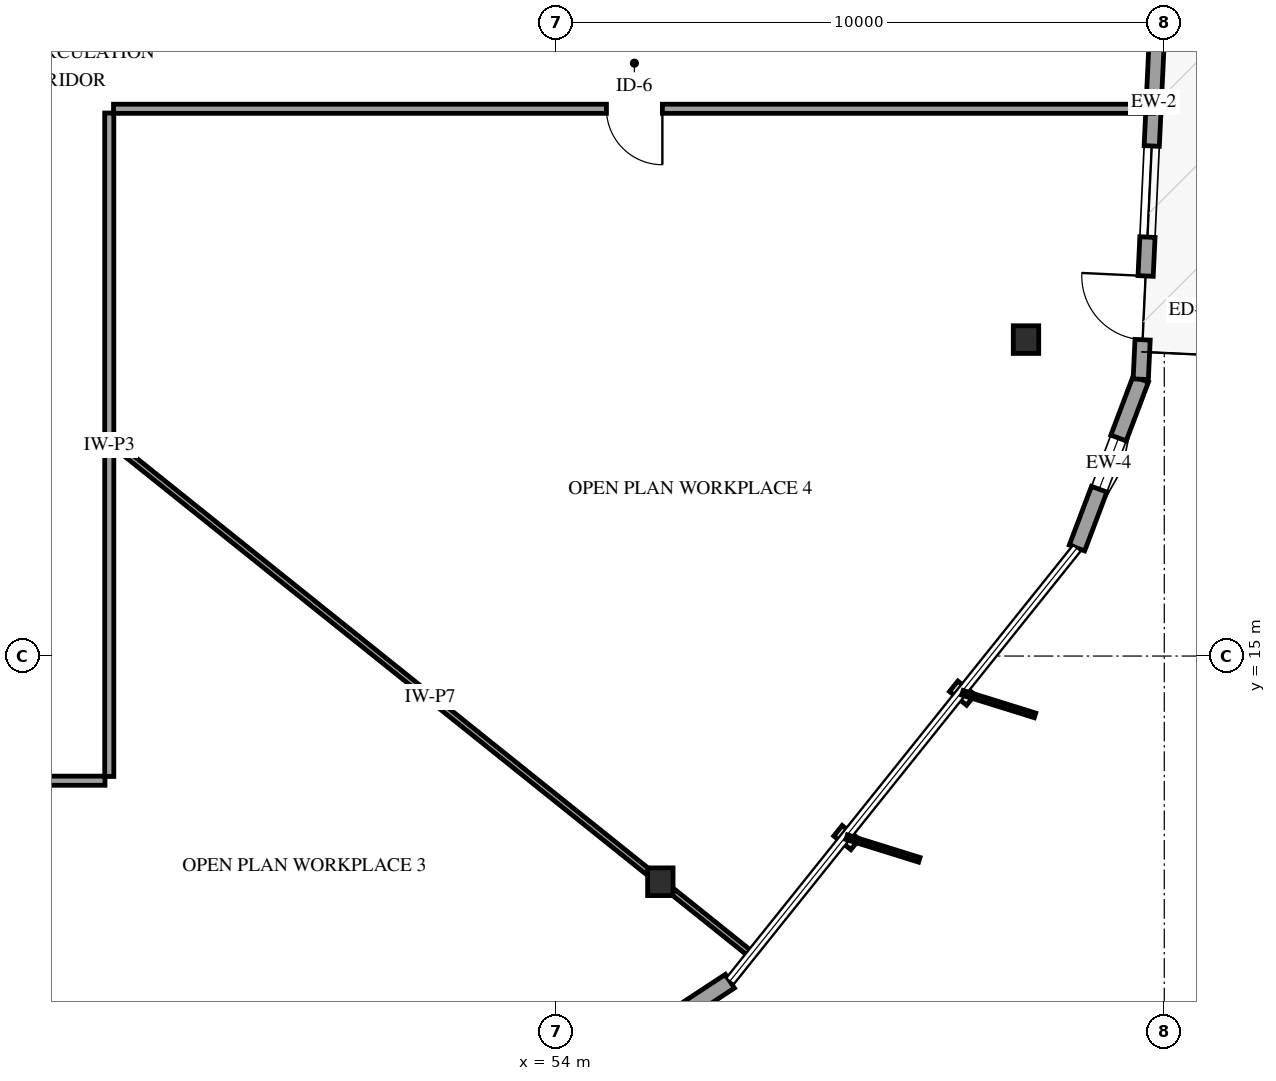
"""IFC4 building model, lengths in metres.
Left out: names, types, materials, properties, quantities, classifications, styles, units other than length and angle.
Written with IfcOpenShell. Run it as: python <this file> out.ifc"""

import sys

from ifc_helpers import new_model, si_unit, direction, frame, frame_2d, origin, origin_2d, place, context, subcontext, project, spatial, rectangle, i_section, extrude, element, fill, save


model = new_model("IFC4")
c1 = context("Model", 3, precision=1e-05, world=origin(), true_north=direction((0.0, 1.0)))
c2 = subcontext(c1, "Body", "Model", "MODEL_VIEW")
j1 = project(units=[si_unit("LENGTHUNIT", "METRE"), si_unit("PLANEANGLEUNIT", "RADIAN")], contexts=[c1])
p1 = place(None, origin())
s1 = spatial("IfcSite", under=j1, at=p1, CompositionType="ELEMENT")
p2 = place(p1, origin())
s2 = spatial("IfcBuilding", under=s1, at=p2, CompositionType="ELEMENT")
p3 = place(p2, frame((0.0, 0.0, 87.4)))
s3 = spatial("IfcBuildingStorey", under=s2, at=p3, CompositionType="ELEMENT", Elevation=87.4)
for number, where, z_axis, x_axis in (
    (1, (55.712, 11.289, -0.3), (0.0, 0.0, 1.0), (1.0, 0.0, 0.0)),
    (2, (61.726, 20.204, -0.3), (0.0, 0.0, 1.0), (1.0, 0.0, 0.0)),
):
    element("IfcColumn", number, at=place(p3, frame(where, z_axis=z_axis, x_axis=x_axis)), inside=s3, PredefinedType="COLUMN", context=c2, shape_type="SweptSolid", body=[
        extrude(i_section(OverallWidth=0.418, OverallDepth=0.455, WebThickness=0.042, FlangeThickness=0.068, FilletRadius=0.038, at=origin_2d()), origin(), (0.0, 0.0, 1.0), 4.2),
    ])
p4 = place(p3, frame((54.377, 8.024, 0.0), z_axis=(0.0, 0.0, 1.0), x_axis=(0.835816616247, 0.549008728533, 0.0)))
e3 = element("IfcWall", 3, at=p4, inside=s3, PredefinedType="SOLIDWALL", context=c2, shape_type="SweptSolid", body=[
    extrude(rectangle(XDim=2.967, YDim=0.27, at=frame_2d((1.483, 0.0))), origin(), (0.0, 0.0, 1.0), 2.979),
])
p5 = place(p4, frame((1.033, 0.0, 0.75)))
e4 = element("IfcOpeningElement", 4, at=p5, cuts=e3, PredefinedType="OPENING", context=c2, shape_type="SweptSolid", body=[
    extrude(rectangle(XDim=0.9, YDim=1.5, at=frame_2d((0.45, 0.75))), frame((0.0, 0.145, 0.0), z_axis=(0.0, -1.0, 0.0), x_axis=(1.0, 0.0, 0.0)), (0.0, 0.0, 1.0), 0.29),
])
p6 = place(p3, frame((62.564, 16.777, 0.0), z_axis=(0.0, 0.0, 1.0), x_axis=(0.35345818185, 0.935450326679, 0.0)))
e5 = element("IfcWall", 5, at=p6, inside=s3, PredefinedType="SOLIDWALL", context=c2, shape_type="SweptSolid", body=[
    extrude(rectangle(XDim=2.967, YDim=0.27, at=frame_2d((1.483, 0.0))), origin(), (0.0, 0.0, 1.0), 2.979),
])
p7 = place(p6, frame((1.033, 0.0, 0.75)))
e6 = element("IfcOpeningElement", 6, at=p7, cuts=e5, PredefinedType="OPENING", context=c2, shape_type="SweptSolid", body=[
    extrude(rectangle(XDim=0.9, YDim=1.5, at=frame_2d((0.45, 0.75))), frame((0.0, 0.145, 0.0), z_axis=(0.0, -1.0, 0.0), x_axis=(1.0, 0.0, 0.0)), (0.0, 0.0, 1.0), 0.29),
])
p8 = place(p3, frame((63.613, 19.552, 0.0), z_axis=(0.0, 0.0, 1.0), x_axis=(0.047119184575, 0.998889274367, 0.0)))
e7 = element("IfcWall", 7, at=p8, inside=s3, PredefinedType="SOLIDWALL", context=c2, shape_type="SweptSolid", body=[
    extrude(rectangle(XDim=9.13, YDim=0.25, at=frame_2d((4.565, 0.0))), origin(), (0.0, 0.0, 1.0), 2.979),
])
p9 = place(p8, frame((0.65, 0.0, 0.0)))
e8 = element("IfcOpeningElement", 8, at=p9, cuts=e7, PredefinedType="OPENING", context=c2, shape_type="SweptSolid", body=[
    extrude(rectangle(XDim=1.05, YDim=2.15, at=frame_2d((0.525, 1.075))), frame((0.0, 0.135, 0.0), z_axis=(0.0, -1.0, 0.0), x_axis=(1.0, 0.0, 0.0)), (0.0, 0.0, 1.0), 0.27),
])
p10 = place(p8, frame((2.34, 0.0, 0.72)))
e9 = element("IfcOpeningElement", 9, at=p10, cuts=e7, PredefinedType="OPENING", context=c2, shape_type="SweptSolid", body=[
    extrude(rectangle(XDim=1.5, YDim=1.7, at=frame_2d((0.75, 0.85))), frame((0.0, 0.135, 0.0), z_axis=(0.0, -1.0, 0.0), x_axis=(1.0, 0.0, 0.0)), (0.0, 0.0, 1.0), 0.27),
])
p11 = place(p3, frame((63.823, 24.0, 0.0), z_axis=(0.0, 0.0, 1.0), x_axis=(-1.0, 0.0, 0.0)))
e10 = element("IfcWall", 10, at=p11, inside=s3, PredefinedType="PARTITIONING", context=c2, shape_type="SweptSolid", body=[
    extrude(rectangle(XDim=17.103, YDim=0.15, at=frame_2d((8.552, 0.0))), origin(), (0.0, 0.0, 1.0), 3.6),
])
p12 = place(p11, frame((8.077, 0.0, 0.0)))
e11 = element("IfcOpeningElement", 11, at=p12, cuts=e10, PredefinedType="OPENING", context=c2, shape_type="SweptSolid", body=[
    extrude(rectangle(XDim=0.92, YDim=2.12, at=frame_2d((0.46, 1.06))), frame((0.0, 0.085, 0.0), z_axis=(0.0, -1.0, 0.0), x_axis=(1.0, 0.0, 0.0)), (0.0, 0.0, 1.0), 0.17),
])
p13 = place(p3, frame((46.65, 18.55, 0.0), z_axis=(0.0, 0.0, 1.0), x_axis=(0.780389673426, -0.625293497176, 0.0)))
e12 = element("IfcWall", 12, at=p13, inside=s3, PredefinedType="PARTITIONING", context=c2, shape_type="SweptSolid", body=[
    extrude(rectangle(XDim=13.528, YDim=0.1, at=frame_2d((6.764, 0.0))), origin(), (0.0, 0.0, 1.0), 3.6),
])
p14 = place(p3, frame((46.58, 12.95, 0.0), z_axis=(0.0, 0.0, 1.0), x_axis=(-1.0, 0.0, 0.0)))
e13 = element("IfcWall", 13, at=p14, inside=s3, PredefinedType="PARTITIONING", context=c2, shape_type="SweptSolid", body=[
    extrude(rectangle(XDim=10.761, YDim=0.15, at=frame_2d((5.38, 0.0))), origin(), (0.0, 0.0, 1.0), 3.6),
])
p15 = place(p14, frame((4.905, 0.0, 0.0)))
e14 = element("IfcOpeningElement", 14, at=p15, cuts=e13, PredefinedType="OPENING", context=c2, shape_type="SweptSolid", body=[
    extrude(rectangle(XDim=0.92, YDim=2.12, at=frame_2d((0.46, 1.06))), frame((0.0, 0.085, 0.0), z_axis=(0.0, -1.0, 0.0), x_axis=(1.0, 0.0, 0.0)), (0.0, 0.0, 1.0), 0.17),
])
p16 = place(p3, frame((46.65, 18.55, 0.0), z_axis=(0.0, 0.0, 1.0), x_axis=(0.0, -1.0, 0.0)))
e15 = element("IfcWall", 15, at=p16, inside=s3, PredefinedType="PARTITIONING", context=c2, shape_type="SweptSolid", body=[
    extrude(rectangle(XDim=5.53, YDim=0.15, at=frame_2d((2.765, 0.0))), origin(), (0.0, 0.0, 1.0), 3.6),
])
p17 = place(p3, frame((46.65, 23.93, 0.0), z_axis=(0.0, 0.0, 1.0), x_axis=(0.0, -1.0, 0.0)))
e16 = element("IfcWall", 16, at=p17, inside=s3, PredefinedType="PARTITIONING", context=c2, shape_type="SweptSolid", body=[
    extrude(rectangle(XDim=5.38, YDim=0.15, at=frame_2d((2.69, 0.0))), origin(), (0.0, 0.0, 1.0), 3.6),
])
p18 = place(p7, origin())
e17 = element("IfcWindow", 17, at=p18, inside=s3, PartitioningType="SINGLE_PANEL", PredefinedType="WINDOW", context=c2, shape_type="SweptSolid", body=[
    extrude(rectangle(XDim=0.9, YDim=1.5, at=frame_2d((0.45, 0.75))), frame((0.0, 0.03, 0.0), z_axis=(0.0, -1.0, 0.0), x_axis=(1.0, 0.0, 0.0)), (0.0, 0.0, 1.0), 0.06),
])
fill(e6, e17)
p19 = place(p9, origin())
e18 = element("IfcDoor", 18, at=p19, inside=s3, OperationType="SINGLE_SWING_RIGHT", PredefinedType="DOOR", context=c2, shape_type="SweptSolid", body=[
    extrude(rectangle(XDim=1.05, YDim=2.15, at=frame_2d((0.525, 1.075))), frame((0.0, 0.025, 0.0), z_axis=(0.0, -1.0, 0.0), x_axis=(1.0, 0.0, 0.0)), (0.0, 0.0, 1.0), 0.05),
])
fill(e8, e18)
p20 = place(p10, origin())
e19 = element("IfcWindow", 19, at=p20, inside=s3, PartitioningType="SINGLE_PANEL", PredefinedType="WINDOW", context=c2, shape_type="SweptSolid", body=[
    extrude(rectangle(XDim=1.5, YDim=1.7, at=frame_2d((0.75, 0.85))), frame((0.0, 0.03, 0.0), z_axis=(0.0, -1.0, 0.0), x_axis=(1.0, 0.0, 0.0)), (0.0, 0.0, 1.0), 0.06),
])
fill(e9, e19)
p21 = place(p12, origin())
e20 = element("IfcDoor", 20, at=p21, inside=s3, OperationType="SINGLE_SWING_LEFT", PredefinedType="DOOR", context=c2, shape_type="SweptSolid", body=[
    extrude(rectangle(XDim=0.92, YDim=2.12, at=frame_2d((0.46, 1.06))), frame((0.0, 0.025, 0.0), z_axis=(0.0, -1.0, 0.0), x_axis=(1.0, 0.0, 0.0)), (0.0, 0.0, 1.0), 0.05),
])
fill(e11, e20)
save(model, sys.argv[1])
